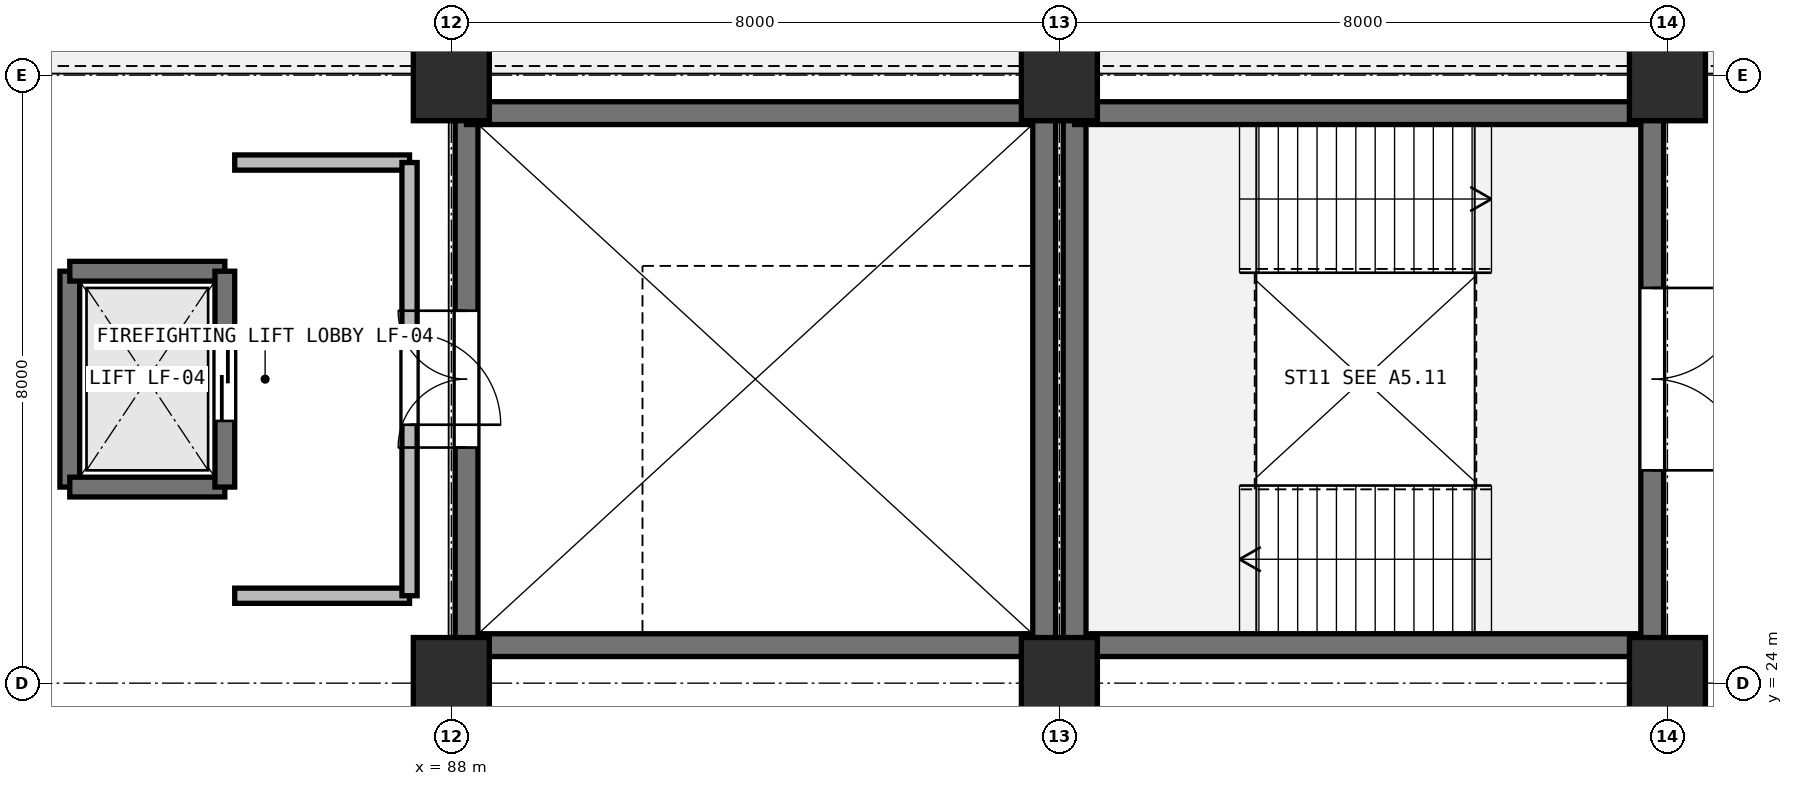
"""IFC4 building model, lengths in metres.
Left out: names, types, materials, properties, quantities, classifications, styles, units other than length and angle.
Written with IfcOpenShell. Run it as: python <this file> out.ifc"""

import sys

from ifc_helpers import new_model, si_unit, direction, frame, frame_2d, origin, origin_2d, place, context, subcontext, project, spatial, rectangle, extrude, element, fill, save


model = new_model("IFC4")
c1 = context("Model", 3, precision=1e-05, world=origin(), true_north=direction((0.0, 1.0)))
c2 = subcontext(c1, "Body", "Model", "MODEL_VIEW")
j1 = project(units=[si_unit("LENGTHUNIT", "METRE"), si_unit("PLANEANGLEUNIT", "RADIAN")], contexts=[c1])
p1 = place(None, origin())
s1 = spatial("IfcSite", under=j1, at=p1, CompositionType="ELEMENT")
p2 = place(p1, origin())
s2 = spatial("IfcBuilding", under=s1, at=p2, CompositionType="ELEMENT")
p3 = place(p2, frame((0.0, 0.0, 15.0)))
s3 = spatial("IfcBuildingStorey", under=s2, at=p3, CompositionType="ELEMENT", Elevation=15.0)
for number, where, z_axis, x_axis in (
    (1, (88.0, 24.0, 0.0), (0.0, 0.0, 1.0), (1.0, 0.0, 0.0)),
    (2, (88.0, 32.0, 0.0), (0.0, 0.0, 1.0), (1.0, 0.0, 0.0)),
    (3, (96.0, 24.0, 0.0), (0.0, 0.0, 1.0), (1.0, 0.0, 0.0)),
    (4, (96.0, 32.0, 0.0), (0.0, 0.0, 1.0), (1.0, 0.0, 0.0)),
    (5, (104.0, 24.0, 0.0), (0.0, 0.0, 1.0), (1.0, 0.0, 0.0)),
    (6, (104.0, 32.0, 0.0), (0.0, 0.0, 1.0), (1.0, 0.0, 0.0)),
):
    element("IfcColumn", number, at=place(p3, frame(where, z_axis=z_axis, x_axis=x_axis)), inside=s3, PredefinedType="COLUMN", context=c2, shape_type="SweptSolid", body=[
        extrude(rectangle(XDim=1.0, YDim=1.2, at=origin_2d()), origin(), (0.0, 0.0, 1.0), 4.8),
    ])
p4 = place(p3, frame((103.8, 24.5, 0.0), z_axis=(0.0, 0.0, 1.0), x_axis=(-1.0, 0.0, 0.0)))
e7 = element("IfcWall", 7, at=p4, inside=s3, PredefinedType="SHEAR", context=c2, shape_type="SweptSolid", body=[
    extrude(rectangle(XDim=7.6, YDim=0.3, at=frame_2d((3.8, 0.0))), origin(), (0.0, 0.0, 1.0), 4.5),
])
p5 = place(p3, frame((96.2, 24.5, 0.0), z_axis=(0.0, 0.0, 1.0), x_axis=(0.0, 1.0, 0.0)))
e8 = element("IfcWall", 8, at=p5, inside=s3, PredefinedType="SHEAR", context=c2, shape_type="SweptSolid", body=[
    extrude(rectangle(XDim=7.0, YDim=0.3, at=frame_2d((3.5, 0.0))), origin(), (0.0, 0.0, 1.0), 4.5),
])
p6 = place(p3, frame((96.2, 31.5, 0.0), z_axis=(0.0, 0.0, 1.0), x_axis=(1.0, 0.0, 0.0)))
e9 = element("IfcWall", 9, at=p6, inside=s3, PredefinedType="SHEAR", context=c2, shape_type="SweptSolid", body=[
    extrude(rectangle(XDim=7.6, YDim=0.3, at=frame_2d((3.8, 0.0))), origin(), (0.0, 0.0, 1.0), 4.5),
])
p7 = place(p3, frame((103.8, 31.5, 0.0), z_axis=(0.0, 0.0, 1.0), x_axis=(0.0, -1.0, 0.0)))
e10 = element("IfcWall", 10, at=p7, inside=s3, PredefinedType="SHEAR", context=c2, shape_type="SweptSolid", body=[
    extrude(rectangle(XDim=7.0, YDim=0.3, at=frame_2d((3.5, 0.0))), origin(), (0.0, 0.0, 1.0), 4.5),
])
p8 = place(p7, frame((2.3, 0.0, 0.0)))
e11 = element("IfcOpeningElement", 11, at=p8, cuts=e10, PredefinedType="OPENING", context=c2, shape_type="SweptSolid", body=[
    extrude(rectangle(XDim=2.4, YDim=2.2, at=frame_2d((1.2, 1.1))), frame((0.0, 0.16, 0.0), z_axis=(0.0, -1.0, 0.0), x_axis=(1.0, 0.0, 0.0)), (0.0, 0.0, 1.0), 0.32),
])
p9 = place(p3, frame((95.8, 24.5, 0.0), z_axis=(0.0, 0.0, 1.0), x_axis=(-1.0, 0.0, 0.0)))
e12 = element("IfcWall", 12, at=p9, inside=s3, PredefinedType="SHEAR", context=c2, shape_type="SweptSolid", body=[
    extrude(rectangle(XDim=7.6, YDim=0.3, at=frame_2d((3.8, 0.0))), origin(), (0.0, 0.0, 1.0), 4.5),
])
p10 = place(p3, frame((88.2, 24.5, 0.0), z_axis=(0.0, 0.0, 1.0), x_axis=(0.0, 1.0, 0.0)))
e13 = element("IfcWall", 13, at=p10, inside=s3, PredefinedType="SHEAR", context=c2, shape_type="SweptSolid", body=[
    extrude(rectangle(XDim=7.0, YDim=0.3, at=frame_2d((3.5, 0.0))), origin(), (0.0, 0.0, 1.0), 4.5),
])
p11 = place(p10, frame((2.6, 0.0, 0.0)))
e14 = element("IfcOpeningElement", 14, at=p11, cuts=e13, PredefinedType="OPENING", context=c2, shape_type="SweptSolid", body=[
    extrude(rectangle(XDim=1.8, YDim=2.2, at=frame_2d((0.9, 1.1))), frame((0.0, 0.16, 0.0), z_axis=(0.0, -1.0, 0.0), x_axis=(1.0, 0.0, 0.0)), (0.0, 0.0, 1.0), 0.32),
])
p12 = place(p3, frame((88.2, 31.5, 0.0), z_axis=(0.0, 0.0, 1.0), x_axis=(1.0, 0.0, 0.0)))
e15 = element("IfcWall", 15, at=p12, inside=s3, PredefinedType="SHEAR", context=c2, shape_type="SweptSolid", body=[
    extrude(rectangle(XDim=7.6, YDim=0.3, at=frame_2d((3.8, 0.0))), origin(), (0.0, 0.0, 1.0), 4.5),
])
p13 = place(p3, frame((95.8, 31.5, 0.0), z_axis=(0.0, 0.0, 1.0), x_axis=(0.0, -1.0, 0.0)))
e16 = element("IfcWall", 16, at=p13, inside=s3, PredefinedType="SHEAR", context=c2, shape_type="SweptSolid", body=[
    extrude(rectangle(XDim=7.0, YDim=0.3, at=frame_2d((3.5, 0.0))), origin(), (0.0, 0.0, 1.0), 4.5),
])
p14 = place(p3, frame((82.98, 26.58, 0.0), z_axis=(0.0, 0.0, 1.0), x_axis=(0.0, 1.0, 0.0)))
e17 = element("IfcWall", 17, at=p14, inside=s3, PredefinedType="SHEAR", context=c2, shape_type="SweptSolid", body=[
    extrude(rectangle(XDim=2.84, YDim=0.26, at=frame_2d((1.42, 0.0))), origin(), (0.0, 0.0, 1.0), 4.5),
])
for number, where, z_axis, x_axis in (
    (18, (82.98, 29.42, 0.0), (0.0, 0.0, 1.0), (1.0, 0.0, 0.0)),
    (19, (85.02, 26.58, 0.0), (0.0, 0.0, 1.0), (-1.0, 0.0, 0.0)),
):
    element("IfcWall", number, at=place(p3, frame(where, z_axis=z_axis, x_axis=x_axis)), inside=s3, PredefinedType="SHEAR", context=c2, shape_type="SweptSolid", body=[
        extrude(rectangle(XDim=2.04, YDim=0.26, at=frame_2d((1.02, 0.0))), origin(), (0.0, 0.0, 1.0), 4.5),
    ])
p15 = place(p3, frame((85.02, 29.42, 0.0), z_axis=(0.0, 0.0, 1.0), x_axis=(0.0, -1.0, 0.0)))
e20 = element("IfcWall", 20, at=p15, inside=s3, PredefinedType="SHEAR", context=c2, shape_type="SweptSolid", body=[
    extrude(rectangle(XDim=2.84, YDim=0.26, at=frame_2d((1.42, 0.0))), origin(), (0.0, 0.0, 1.0), 4.5),
])
p16 = place(p15, frame((0.87, 0.0, 0.0)))
e21 = element("IfcOpeningElement", 21, at=p16, cuts=e20, PredefinedType="OPENING", context=c2, shape_type="SweptSolid", body=[
    extrude(rectangle(XDim=1.1, YDim=2.15, at=frame_2d((0.55, 1.075))), frame((0.0, 0.14, 0.0), z_axis=(0.0, -1.0, 0.0), x_axis=(1.0, 0.0, 0.0)), (0.0, 0.0, 1.0), 0.28),
])
for number, where, z_axis, x_axis in (
    (22, (85.15, 30.85, 0.0), (0.0, 0.0, 1.0), (1.0, 0.0, 0.0)),
    (23, (87.45, 25.15, 0.0), (0.0, 0.0, 1.0), (-1.0, 0.0, 0.0)),
):
    element("IfcWall", number, at=place(p3, frame(where, z_axis=z_axis, x_axis=x_axis)), inside=s3, PredefinedType="PARTITIONING", context=c2, shape_type="SweptSolid", body=[
        extrude(rectangle(XDim=2.3, YDim=0.2, at=frame_2d((1.15, 0.0))), origin(), (0.0, 0.0, 1.0), 4.5),
    ])
p17 = place(p3, frame((87.45, 30.85, 0.0), z_axis=(0.0, 0.0, 1.0), x_axis=(0.0, -1.0, 0.0)))
e24 = element("IfcWall", 24, at=p17, inside=s3, PredefinedType="PARTITIONING", context=c2, shape_type="SweptSolid", body=[
    extrude(rectangle(XDim=5.7, YDim=0.2, at=frame_2d((2.85, 0.0))), origin(), (0.0, 0.0, 1.0), 3.6),
])
p18 = place(p17, frame((2.25, 0.0, 0.0)))
e25 = element("IfcOpeningElement", 25, at=p18, cuts=e24, PredefinedType="OPENING", context=c2, shape_type="SweptSolid", body=[
    extrude(rectangle(XDim=1.2, YDim=2.2, at=frame_2d((0.6, 1.1))), frame((0.0, 0.11, 0.0), z_axis=(0.0, -1.0, 0.0), x_axis=(1.0, 0.0, 0.0)), (0.0, 0.0, 1.0), 0.22),
])
p19 = place(p8, frame((2.4, 0.0, 0.0), z_axis=(0.0, 0.0, 1.0), x_axis=(-1.0, 0.0, 0.0)))
e26 = element("IfcDoor", 26, at=p19, inside=s3, OperationType="DOUBLE_DOOR_SINGLE_SWING", PredefinedType="DOOR", context=c2, shape_type="SweptSolid", body=[
    extrude(rectangle(XDim=2.4, YDim=2.2, at=frame_2d((1.2, 1.1))), frame((0.0, 0.025, 0.0), z_axis=(0.0, -1.0, 0.0), x_axis=(1.0, 0.0, 0.0)), (0.0, 0.0, 1.0), 0.05),
])
fill(e11, e26)
p20 = place(p11, frame((1.8, 0.0, 0.0), z_axis=(0.0, 0.0, 1.0), x_axis=(-1.0, 0.0, 0.0)))
e27 = element("IfcDoor", 27, at=p20, inside=s3, OperationType="DOUBLE_DOOR_SINGLE_SWING", PredefinedType="DOOR", context=c2, shape_type="SweptSolid", body=[
    extrude(rectangle(XDim=1.8, YDim=2.2, at=frame_2d((0.9, 1.1))), frame((0.0, 0.025, 0.0), z_axis=(0.0, -1.0, 0.0), x_axis=(1.0, 0.0, 0.0)), (0.0, 0.0, 1.0), 0.05),
])
fill(e14, e27)
p21 = place(p16, origin())
e28 = element("IfcDoor", 28, at=p21, inside=s3, OperationType="SLIDING_TO_LEFT", PredefinedType="DOOR", context=c2, shape_type="SweptSolid", body=[
    extrude(rectangle(XDim=1.1, YDim=2.15, at=frame_2d((0.55, 1.075))), frame((0.0, 0.025, 0.0), z_axis=(0.0, -1.0, 0.0), x_axis=(1.0, 0.0, 0.0)), (0.0, 0.0, 1.0), 0.05),
])
fill(e21, e28)
p22 = place(p18, origin())
e29 = element("IfcDoor", 29, at=p22, inside=s3, OperationType="SINGLE_SWING_RIGHT", PredefinedType="DOOR", context=c2, shape_type="SweptSolid", body=[
    extrude(rectangle(XDim=1.2, YDim=2.2, at=frame_2d((0.6, 1.1))), frame((0.0, 0.025, 0.0), z_axis=(0.0, -1.0, 0.0), x_axis=(1.0, 0.0, 0.0)), (0.0, 0.0, 1.0), 0.05),
])
fill(e25, e29)
save(model, sys.argv[1])
